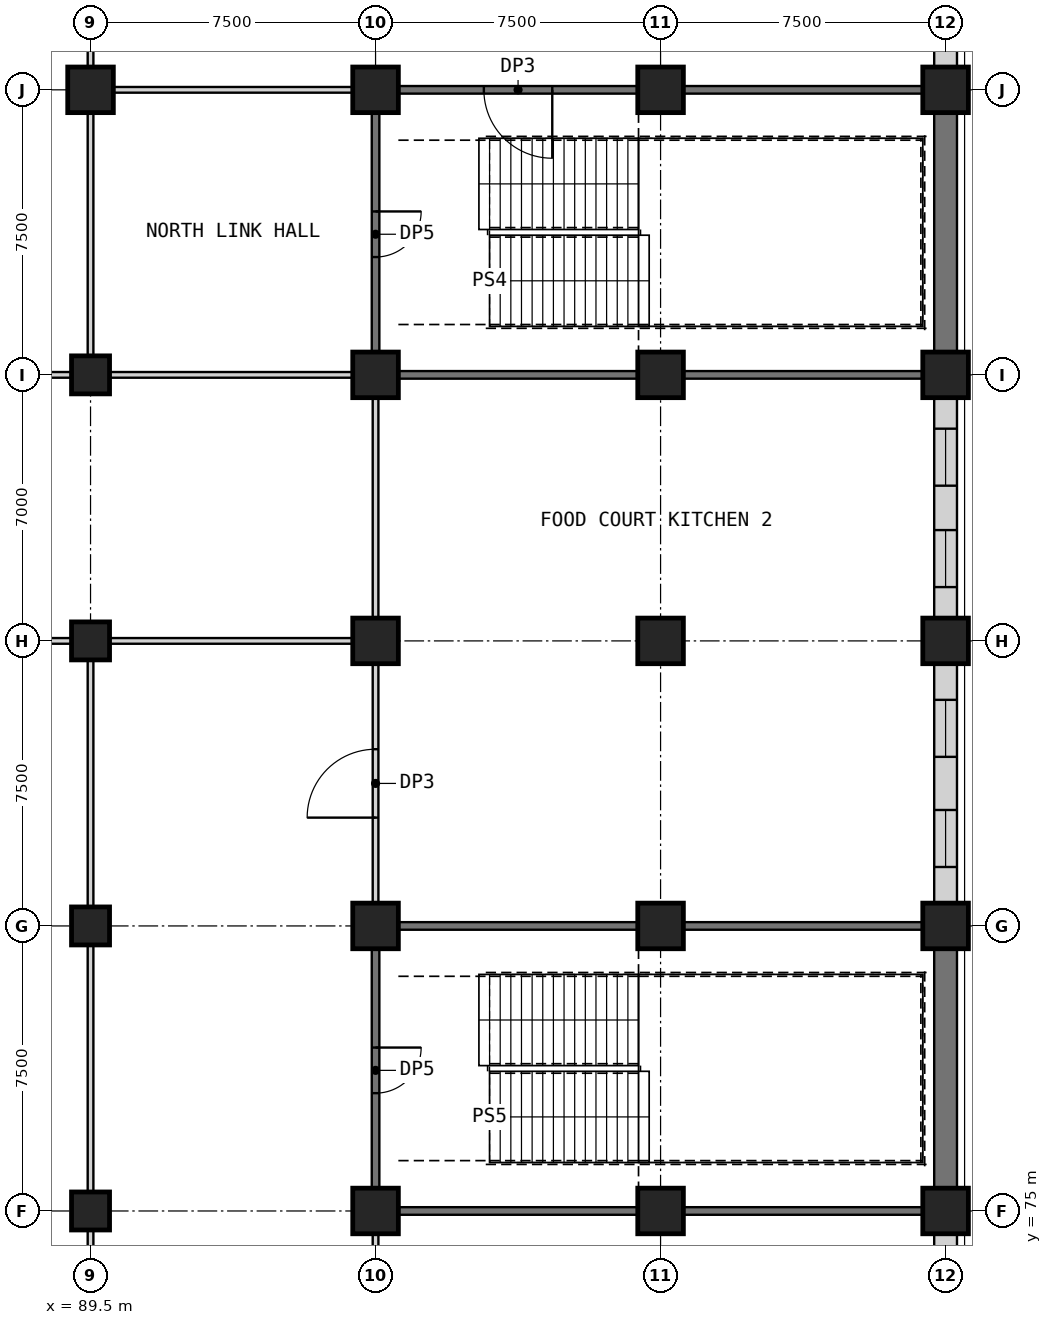
"""IFC4 building model, lengths in metres.
Left out: names, types, materials, properties, quantities, classifications, styles, units other than length and angle.
Written with IfcOpenShell. Run it as: python <this file> out.ifc"""

import sys

from ifc_helpers import new_model, si_unit, direction, frame, frame_2d, origin, origin_2d, place, context, subcontext, project, spatial, rectangle, extrude, element, fill, save


model = new_model("IFC4")
c1 = context("Model", 3, precision=1e-05, world=origin(), true_north=direction((0.0, 1.0)))
c2 = subcontext(c1, "Body", "Model", "MODEL_VIEW")
j1 = project(units=[si_unit("LENGTHUNIT", "METRE"), si_unit("PLANEANGLEUNIT", "RADIAN")], contexts=[c1])
p1 = place(None, origin())
s1 = spatial("IfcSite", under=j1, at=p1, CompositionType="ELEMENT")
p2 = place(p1, origin())
s2 = spatial("IfcBuilding", under=s1, at=p2, CompositionType="ELEMENT")
p3 = place(p2, frame((0.0, 0.0, 18.5)))
s3 = spatial("IfcBuildingStorey", under=s2, at=p3, CompositionType="ELEMENT", Elevation=18.5)
for number, where, z_axis, x_axis in (
    (1, (89.5, 75.0, 0.0), (0.0, 0.0, 1.0), (1.0, 0.0, 0.0)),
    (2, (89.5, 82.5, 0.0), (0.0, 0.0, 1.0), (1.0, 0.0, 0.0)),
    (3, (89.5, 90.0, 0.0), (0.0, 0.0, 1.0), (1.0, 0.0, 0.0)),
    (4, (89.5, 97.0, 0.0), (0.0, 0.0, 1.0), (1.0, 0.0, 0.0)),
):
    element("IfcColumn", number, at=place(p3, frame(where, z_axis=z_axis, x_axis=x_axis)), inside=s3, PredefinedType="COLUMN", context=c2, shape_type="SweptSolid", body=[
        extrude(rectangle(XDim=1.0, YDim=1.0, at=origin_2d()), origin(), (0.0, 0.0, 1.0), 5.0),
    ])
for number, where, z_axis, x_axis in (
    (5, (89.5, 104.5, 0.0), (0.0, 0.0, 1.0), (1.0, 0.0, 0.0)),
    (6, (97.0, 75.0, 0.0), (0.0, 0.0, 1.0), (1.0, 0.0, 0.0)),
    (7, (97.0, 82.5, 0.0), (0.0, 0.0, 1.0), (1.0, 0.0, 0.0)),
    (8, (97.0, 90.0, 0.0), (0.0, 0.0, 1.0), (1.0, 0.0, 0.0)),
    (9, (97.0, 97.0, 0.0), (0.0, 0.0, 1.0), (1.0, 0.0, 0.0)),
    (10, (97.0, 104.5, 0.0), (0.0, 0.0, 1.0), (1.0, 0.0, 0.0)),
    (11, (104.5, 75.0, 0.0), (0.0, 0.0, 1.0), (1.0, 0.0, 0.0)),
    (12, (104.5, 82.5, 0.0), (0.0, 0.0, 1.0), (1.0, 0.0, 0.0)),
    (13, (104.5, 90.0, 0.0), (0.0, 0.0, 1.0), (1.0, 0.0, 0.0)),
    (14, (104.5, 97.0, 0.0), (0.0, 0.0, 1.0), (1.0, 0.0, 0.0)),
    (15, (104.5, 104.5, 0.0), (0.0, 0.0, 1.0), (1.0, 0.0, 0.0)),
    (16, (112.0, 75.0, 0.0), (0.0, 0.0, 1.0), (1.0, 0.0, 0.0)),
    (17, (112.0, 82.5, 0.0), (0.0, 0.0, 1.0), (1.0, 0.0, 0.0)),
    (18, (112.0, 90.0, 0.0), (0.0, 0.0, 1.0), (1.0, 0.0, 0.0)),
    (19, (112.0, 97.0, 0.0), (0.0, 0.0, 1.0), (1.0, 0.0, 0.0)),
    (20, (112.0, 104.5, 0.0), (0.0, 0.0, 1.0), (1.0, 0.0, 0.0)),
):
    element("IfcColumn", number, at=place(p3, frame(where, z_axis=z_axis, x_axis=x_axis)), inside=s3, PredefinedType="COLUMN", context=c2, shape_type="SweptSolid", body=[
        extrude(rectangle(XDim=1.2, YDim=1.2, at=origin_2d()), origin(), (0.0, 0.0, 1.0), 5.0),
    ])
for number, where, z_axis, x_axis in (
    (21, (82.6, 97.0, 0.0), (0.0, 0.0, 1.0), (1.0, 0.0, 0.0)),
    (22, (90.0, 97.0, 0.0), (0.0, 0.0, 1.0), (1.0, 0.0, 0.0)),
):
    element("IfcWall", number, at=place(p3, frame(where, z_axis=z_axis, x_axis=x_axis)), inside=s3, PredefinedType="PARTITIONING", context=c2, shape_type="SweptSolid", body=[
        extrude(rectangle(XDim=6.4, YDim=0.15, at=frame_2d((3.2, 0.0))), origin(), (0.0, 0.0, 1.0), 4.7),
    ])
for number, where, z_axis, x_axis in (
    (23, (97.6, 97.0, 0.0), (0.0, 0.0, 1.0), (1.0, 0.0, 0.0)),
    (24, (105.1, 97.0, 0.0), (0.0, 0.0, 1.0), (1.0, 0.0, 0.0)),
    (25, (97.6, 75.0, 0.0), (0.0, 0.0, 1.0), (1.0, 0.0, 0.0)),
    (26, (105.1, 75.0, 0.0), (0.0, 0.0, 1.0), (1.0, 0.0, 0.0)),
    (27, (97.6, 82.5, 0.0), (0.0, 0.0, 1.0), (1.0, 0.0, 0.0)),
    (28, (105.1, 82.5, 0.0), (0.0, 0.0, 1.0), (1.0, 0.0, 0.0)),
):
    element("IfcWall", number, at=place(p3, frame(where, z_axis=z_axis, x_axis=x_axis)), inside=s3, PredefinedType="SHEAR", context=c2, shape_type="SweptSolid", body=[
        extrude(rectangle(XDim=6.3, YDim=0.2, at=frame_2d((3.15, 0.0))), origin(), (0.0, 0.0, 1.0), 4.7),
    ])
p4 = place(p3, frame((90.1, 104.5, 0.0), z_axis=(0.0, 0.0, 1.0), x_axis=(1.0, 0.0, 0.0)))
e29 = element("IfcWall", 29, at=p4, inside=s3, PredefinedType="PARTITIONING", context=c2, shape_type="SweptSolid", body=[
    extrude(rectangle(XDim=6.3, YDim=0.15, at=frame_2d((3.15, 0.0))), origin(), (0.0, 0.0, 1.0), 4.7),
])
p5 = place(p3, frame((103.9, 104.5, 0.0), z_axis=(0.0, 0.0, 1.0), x_axis=(-1.0, 0.0, 0.0)))
e30 = element("IfcWall", 30, at=p5, inside=s3, PredefinedType="SHEAR", context=c2, shape_type="SweptSolid", body=[
    extrude(rectangle(XDim=6.3, YDim=0.2, at=frame_2d((3.15, 0.0))), origin(), (0.0, 0.0, 1.0), 4.7),
])
p6 = place(p5, frame((2.25, 0.0, 0.0)))
e31 = element("IfcOpeningElement", 31, at=p6, cuts=e30, PredefinedType="OPENING", context=c2, shape_type="SweptSolid", body=[
    extrude(rectangle(XDim=1.8, YDim=2.4, at=frame_2d((0.9, 1.2))), frame((0.0, 0.11, 0.0), z_axis=(0.0, -1.0, 0.0), x_axis=(1.0, 0.0, 0.0)), (0.0, 0.0, 1.0), 0.22),
])
p7 = place(p3, frame((105.1, 104.5, 0.0), z_axis=(0.0, 0.0, 1.0), x_axis=(1.0, 0.0, 0.0)))
e32 = element("IfcWall", 32, at=p7, inside=s3, PredefinedType="SHEAR", context=c2, shape_type="SweptSolid", body=[
    extrude(rectangle(XDim=6.3, YDim=0.2, at=frame_2d((3.15, 0.0))), origin(), (0.0, 0.0, 1.0), 4.7),
])
for number, where, z_axis, x_axis in (
    (33, (82.6, 90.0, 0.0), (0.0, 0.0, 1.0), (1.0, 0.0, 0.0)),
    (34, (90.0, 90.0, 0.0), (0.0, 0.0, 1.0), (1.0, 0.0, 0.0)),
):
    element("IfcWall", number, at=place(p3, frame(where, z_axis=z_axis, x_axis=x_axis)), inside=s3, PredefinedType="PARTITIONING", context=c2, shape_type="SweptSolid", body=[
        extrude(rectangle(XDim=6.4, YDim=0.15, at=frame_2d((3.2, 0.0))), origin(), (0.0, 0.0, 1.0), 4.7),
    ])
p8 = place(p3, frame((97.0, 68.1, 0.0), z_axis=(0.0, 0.0, 1.0), x_axis=(0.0, 1.0, 0.0)))
e35 = element("IfcWall", 35, at=p8, inside=s3, PredefinedType="PARTITIONING", context=c2, shape_type="SweptSolid", body=[
    extrude(rectangle(XDim=6.3, YDim=0.15, at=frame_2d((3.15, 0.0))), origin(), (0.0, 0.0, 1.0), 4.7),
])
p9 = place(p3, frame((97.0, 81.9, 0.0), z_axis=(0.0, 0.0, 1.0), x_axis=(0.0, -1.0, 0.0)))
e36 = element("IfcWall", 36, at=p9, inside=s3, PredefinedType="SHEAR", context=c2, shape_type="SweptSolid", body=[
    extrude(rectangle(XDim=6.3, YDim=0.2, at=frame_2d((3.15, 0.0))), origin(), (0.0, 0.0, 1.0), 4.7),
])
p10 = place(p9, frame((2.6, 0.0, 0.0)))
e37 = element("IfcOpeningElement", 37, at=p10, cuts=e36, PredefinedType="OPENING", context=c2, shape_type="SweptSolid", body=[
    extrude(rectangle(XDim=1.2, YDim=2.1, at=frame_2d((0.6, 1.05))), frame((0.0, 0.11, 0.0), z_axis=(0.0, -1.0, 0.0), x_axis=(1.0, 0.0, 0.0)), (0.0, 0.0, 1.0), 0.22),
])
p11 = place(p3, frame((97.0, 83.1, 0.0), z_axis=(0.0, 0.0, 1.0), x_axis=(0.0, 1.0, 0.0)))
e38 = element("IfcWall", 38, at=p11, inside=s3, PredefinedType="PARTITIONING", context=c2, shape_type="SweptSolid", body=[
    extrude(rectangle(XDim=6.3, YDim=0.15, at=frame_2d((3.15, 0.0))), origin(), (0.0, 0.0, 1.0), 4.7),
])
p12 = place(p11, frame((2.25, 0.0, 0.0)))
e39 = element("IfcOpeningElement", 39, at=p12, cuts=e38, PredefinedType="OPENING", context=c2, shape_type="SweptSolid", body=[
    extrude(rectangle(XDim=1.8, YDim=2.4, at=frame_2d((0.9, 1.2))), frame((0.0, 0.085, 0.0), z_axis=(0.0, -1.0, 0.0), x_axis=(1.0, 0.0, 0.0)), (0.0, 0.0, 1.0), 0.17),
])
p13 = place(p3, frame((97.0, 90.6, 0.0), z_axis=(0.0, 0.0, 1.0), x_axis=(0.0, 1.0, 0.0)))
e40 = element("IfcWall", 40, at=p13, inside=s3, PredefinedType="PARTITIONING", context=c2, shape_type="SweptSolid", body=[
    extrude(rectangle(XDim=5.8, YDim=0.15, at=frame_2d((2.9, 0.0))), origin(), (0.0, 0.0, 1.0), 4.7),
])
p14 = place(p3, frame((97.0, 103.9, 0.0), z_axis=(0.0, 0.0, 1.0), x_axis=(0.0, -1.0, 0.0)))
e41 = element("IfcWall", 41, at=p14, inside=s3, PredefinedType="SHEAR", context=c2, shape_type="SweptSolid", body=[
    extrude(rectangle(XDim=6.3, YDim=0.2, at=frame_2d((3.15, 0.0))), origin(), (0.0, 0.0, 1.0), 4.7),
])
p15 = place(p14, frame((2.6, 0.0, 0.0)))
e42 = element("IfcOpeningElement", 42, at=p15, cuts=e41, PredefinedType="OPENING", context=c2, shape_type="SweptSolid", body=[
    extrude(rectangle(XDim=1.2, YDim=2.1, at=frame_2d((0.6, 1.05))), frame((0.0, 0.11, 0.0), z_axis=(0.0, -1.0, 0.0), x_axis=(1.0, 0.0, 0.0)), (0.0, 0.0, 1.0), 0.22),
])
p16 = place(p3, frame((112.0, 68.1, 0.0), z_axis=(0.0, 0.0, 1.0), x_axis=(0.0, 1.0, 0.0)))
e43 = element("IfcWall", 43, at=p16, inside=s3, PredefinedType="PARTITIONING", context=c2, shape_type="SweptSolid", body=[
    extrude(rectangle(XDim=6.3, YDim=0.6, at=frame_2d((3.15, 0.0))), origin(), (0.0, 0.0, 1.0), 4.1),
])
p17 = place(p16, frame((0.951, 0.0, 0.9)))
e44 = element("IfcOpeningElement", 44, at=p17, cuts=e43, PredefinedType="OPENING", context=c2, shape_type="SweptSolid", body=[
    extrude(rectangle(XDim=1.5, YDim=2.8, at=frame_2d((0.75, 1.4))), frame((0.0, 0.31, 0.0), z_axis=(0.0, -1.0, 0.0), x_axis=(1.0, 0.0, 0.0)), (0.0, 0.0, 1.0), 0.62),
])
p18 = place(p16, frame((3.849, 0.0, 0.9)))
e45 = element("IfcOpeningElement", 45, at=p18, cuts=e43, PredefinedType="OPENING", context=c2, shape_type="SweptSolid", body=[
    extrude(rectangle(XDim=1.5, YDim=2.8, at=frame_2d((0.75, 1.4))), frame((0.0, 0.31, 0.0), z_axis=(0.0, -1.0, 0.0), x_axis=(1.0, 0.0, 0.0)), (0.0, 0.0, 1.0), 0.62),
])
p19 = place(p3, frame((112.0, 75.6, 0.0), z_axis=(0.0, 0.0, 1.0), x_axis=(0.0, 1.0, 0.0)))
e46 = element("IfcWall", 46, at=p19, inside=s3, PredefinedType="PARTITIONING", context=c2, shape_type="SweptSolid", body=[
    extrude(rectangle(XDim=6.3, YDim=0.6, at=frame_2d((3.15, 0.0))), origin(), (0.0, 0.0, 1.0), 4.1),
])
p20 = place(p3, frame((112.0, 83.1, 0.0), z_axis=(0.0, 0.0, 1.0), x_axis=(0.0, 1.0, 0.0)))
e47 = element("IfcWall", 47, at=p20, inside=s3, PredefinedType="PARTITIONING", context=c2, shape_type="SweptSolid", body=[
    extrude(rectangle(XDim=6.3, YDim=0.6, at=frame_2d((3.15, 0.0))), origin(), (0.0, 0.0, 1.0), 4.1),
])
p21 = place(p20, frame((0.951, 0.0, 0.9)))
e48 = element("IfcOpeningElement", 48, at=p21, cuts=e47, PredefinedType="OPENING", context=c2, shape_type="SweptSolid", body=[
    extrude(rectangle(XDim=1.5, YDim=2.8, at=frame_2d((0.75, 1.4))), frame((0.0, 0.31, 0.0), z_axis=(0.0, -1.0, 0.0), x_axis=(1.0, 0.0, 0.0)), (0.0, 0.0, 1.0), 0.62),
])
p22 = place(p20, frame((3.849, 0.0, 0.9)))
e49 = element("IfcOpeningElement", 49, at=p22, cuts=e47, PredefinedType="OPENING", context=c2, shape_type="SweptSolid", body=[
    extrude(rectangle(XDim=1.5, YDim=2.8, at=frame_2d((0.75, 1.4))), frame((0.0, 0.31, 0.0), z_axis=(0.0, -1.0, 0.0), x_axis=(1.0, 0.0, 0.0)), (0.0, 0.0, 1.0), 0.62),
])
p23 = place(p3, frame((112.0, 90.6, 0.0), z_axis=(0.0, 0.0, 1.0), x_axis=(0.0, 1.0, 0.0)))
e50 = element("IfcWall", 50, at=p23, inside=s3, PredefinedType="PARTITIONING", context=c2, shape_type="SweptSolid", body=[
    extrude(rectangle(XDim=5.8, YDim=0.6, at=frame_2d((2.9, 0.0))), origin(), (0.0, 0.0, 1.0), 4.1),
])
p24 = place(p23, frame((0.816, 0.0, 0.9)))
e51 = element("IfcOpeningElement", 51, at=p24, cuts=e50, PredefinedType="OPENING", context=c2, shape_type="SweptSolid", body=[
    extrude(rectangle(XDim=1.5, YDim=2.8, at=frame_2d((0.75, 1.4))), frame((0.0, 0.31, 0.0), z_axis=(0.0, -1.0, 0.0), x_axis=(1.0, 0.0, 0.0)), (0.0, 0.0, 1.0), 0.62),
])
p25 = place(p23, frame((3.484, 0.0, 0.9)))
e52 = element("IfcOpeningElement", 52, at=p25, cuts=e50, PredefinedType="OPENING", context=c2, shape_type="SweptSolid", body=[
    extrude(rectangle(XDim=1.5, YDim=2.8, at=frame_2d((0.75, 1.4))), frame((0.0, 0.31, 0.0), z_axis=(0.0, -1.0, 0.0), x_axis=(1.0, 0.0, 0.0)), (0.0, 0.0, 1.0), 0.62),
])
p26 = place(p3, frame((112.0, 97.6, 0.0), z_axis=(0.0, 0.0, 1.0), x_axis=(0.0, 1.0, 0.0)))
e53 = element("IfcWall", 53, at=p26, inside=s3, PredefinedType="PARTITIONING", context=c2, shape_type="SweptSolid", body=[
    extrude(rectangle(XDim=6.3, YDim=0.6, at=frame_2d((3.15, 0.0))), origin(), (0.0, 0.0, 1.0), 4.1),
])
p27 = place(p3, frame((112.0, 105.1, 0.0), z_axis=(0.0, 0.0, 1.0), x_axis=(0.0, 1.0, 0.0)))
e54 = element("IfcWall", 54, at=p27, inside=s3, PredefinedType="PARTITIONING", context=c2, shape_type="SweptSolid", body=[
    extrude(rectangle(XDim=6.3, YDim=0.6, at=frame_2d((3.15, 0.0))), origin(), (0.0, 0.0, 1.0), 4.1),
])
p28 = place(p27, frame((0.951, 0.0, 0.9)))
e55 = element("IfcOpeningElement", 55, at=p28, cuts=e54, PredefinedType="OPENING", context=c2, shape_type="SweptSolid", body=[
    extrude(rectangle(XDim=1.5, YDim=2.8, at=frame_2d((0.75, 1.4))), frame((0.0, 0.31, 0.0), z_axis=(0.0, -1.0, 0.0), x_axis=(1.0, 0.0, 0.0)), (0.0, 0.0, 1.0), 0.62),
])
p29 = place(p27, frame((3.849, 0.0, 0.9)))
e56 = element("IfcOpeningElement", 56, at=p29, cuts=e54, PredefinedType="OPENING", context=c2, shape_type="SweptSolid", body=[
    extrude(rectangle(XDim=1.5, YDim=2.8, at=frame_2d((0.75, 1.4))), frame((0.0, 0.31, 0.0), z_axis=(0.0, -1.0, 0.0), x_axis=(1.0, 0.0, 0.0)), (0.0, 0.0, 1.0), 0.62),
])
for number, where, z_axis, x_axis in (
    (57, (89.5, 68.0, 0.0), (0.0, 0.0, 1.0), (0.0, 1.0, 0.0)),
    (58, (89.5, 75.5, 0.0), (0.0, 0.0, 1.0), (0.0, 1.0, 0.0)),
    (59, (89.5, 83.0, 0.0), (0.0, 0.0, 1.0), (0.0, 1.0, 0.0)),
):
    element("IfcWall", number, at=place(p3, frame(where, z_axis=z_axis, x_axis=x_axis)), inside=s3, PredefinedType="PARTITIONING", context=c2, shape_type="SweptSolid", body=[
        extrude(rectangle(XDim=6.5, YDim=0.15, at=frame_2d((3.25, 0.0))), origin(), (0.0, 0.0, 1.0), 4.7),
    ])
p30 = place(p3, frame((89.5, 97.5, 0.0), z_axis=(0.0, 0.0, 1.0), x_axis=(0.0, 1.0, 0.0)))
e60 = element("IfcWall", 60, at=p30, inside=s3, PredefinedType="PARTITIONING", context=c2, shape_type="SweptSolid", body=[
    extrude(rectangle(XDim=6.4, YDim=0.15, at=frame_2d((3.2, 0.0))), origin(), (0.0, 0.0, 1.0), 4.7),
])
p31 = place(p3, frame((89.5, 105.1, 0.0), z_axis=(0.0, 0.0, 1.0), x_axis=(0.0, 1.0, 0.0)))
e61 = element("IfcWall", 61, at=p31, inside=s3, PredefinedType="PARTITIONING", context=c2, shape_type="SweptSolid", body=[
    extrude(rectangle(XDim=6.3, YDim=0.15, at=frame_2d((3.15, 0.0))), origin(), (0.0, 0.0, 1.0), 4.7),
])
p32 = place(p6, origin())
e62 = element("IfcDoor", 62, at=p32, inside=s3, OperationType="SINGLE_SWING_LEFT", PredefinedType="DOOR", context=c2, shape_type="SweptSolid", body=[
    extrude(rectangle(XDim=1.8, YDim=2.4, at=frame_2d((0.9, 1.2))), frame((0.0, 0.025, 0.0), z_axis=(0.0, -1.0, 0.0), x_axis=(1.0, 0.0, 0.0)), (0.0, 0.0, 1.0), 0.05),
])
fill(e31, e62)
p33 = place(p10, origin())
e63 = element("IfcDoor", 63, at=p33, inside=s3, OperationType="SINGLE_SWING_LEFT", PredefinedType="DOOR", context=c2, shape_type="SweptSolid", body=[
    extrude(rectangle(XDim=1.2, YDim=2.1, at=frame_2d((0.6, 1.05))), frame((0.0, 0.025, 0.0), z_axis=(0.0, -1.0, 0.0), x_axis=(1.0, 0.0, 0.0)), (0.0, 0.0, 1.0), 0.05),
])
fill(e37, e63)
p34 = place(p12, origin())
e64 = element("IfcDoor", 64, at=p34, inside=s3, OperationType="SINGLE_SWING_LEFT", PredefinedType="DOOR", context=c2, shape_type="SweptSolid", body=[
    extrude(rectangle(XDim=1.8, YDim=2.4, at=frame_2d((0.9, 1.2))), frame((0.0, 0.025, 0.0), z_axis=(0.0, -1.0, 0.0), x_axis=(1.0, 0.0, 0.0)), (0.0, 0.0, 1.0), 0.05),
])
fill(e39, e64)
p35 = place(p15, origin())
e65 = element("IfcDoor", 65, at=p35, inside=s3, OperationType="SINGLE_SWING_LEFT", PredefinedType="DOOR", context=c2, shape_type="SweptSolid", body=[
    extrude(rectangle(XDim=1.2, YDim=2.1, at=frame_2d((0.6, 1.05))), frame((0.0, 0.025, 0.0), z_axis=(0.0, -1.0, 0.0), x_axis=(1.0, 0.0, 0.0)), (0.0, 0.0, 1.0), 0.05),
])
fill(e42, e65)
p36 = place(p21, origin())
e66 = element("IfcWindow", 66, at=p36, inside=s3, PartitioningType="SINGLE_PANEL", PredefinedType="WINDOW", context=c2, shape_type="SweptSolid", body=[
    extrude(rectangle(XDim=1.5, YDim=2.8, at=frame_2d((0.75, 1.4))), frame((0.0, 0.03, 0.0), z_axis=(0.0, -1.0, 0.0), x_axis=(1.0, 0.0, 0.0)), (0.0, 0.0, 1.0), 0.06),
])
fill(e48, e66)
p37 = place(p22, origin())
e67 = element("IfcWindow", 67, at=p37, inside=s3, PartitioningType="SINGLE_PANEL", PredefinedType="WINDOW", context=c2, shape_type="SweptSolid", body=[
    extrude(rectangle(XDim=1.5, YDim=2.8, at=frame_2d((0.75, 1.4))), frame((0.0, 0.03, 0.0), z_axis=(0.0, -1.0, 0.0), x_axis=(1.0, 0.0, 0.0)), (0.0, 0.0, 1.0), 0.06),
])
fill(e49, e67)
p38 = place(p24, origin())
e68 = element("IfcWindow", 68, at=p38, inside=s3, PartitioningType="SINGLE_PANEL", PredefinedType="WINDOW", context=c2, shape_type="SweptSolid", body=[
    extrude(rectangle(XDim=1.5, YDim=2.8, at=frame_2d((0.75, 1.4))), frame((0.0, 0.03, 0.0), z_axis=(0.0, -1.0, 0.0), x_axis=(1.0, 0.0, 0.0)), (0.0, 0.0, 1.0), 0.06),
])
fill(e51, e68)
p39 = place(p25, origin())
e69 = element("IfcWindow", 69, at=p39, inside=s3, PartitioningType="SINGLE_PANEL", PredefinedType="WINDOW", context=c2, shape_type="SweptSolid", body=[
    extrude(rectangle(XDim=1.5, YDim=2.8, at=frame_2d((0.75, 1.4))), frame((0.0, 0.03, 0.0), z_axis=(0.0, -1.0, 0.0), x_axis=(1.0, 0.0, 0.0)), (0.0, 0.0, 1.0), 0.06),
])
fill(e52, e69)
save(model, sys.argv[1])
